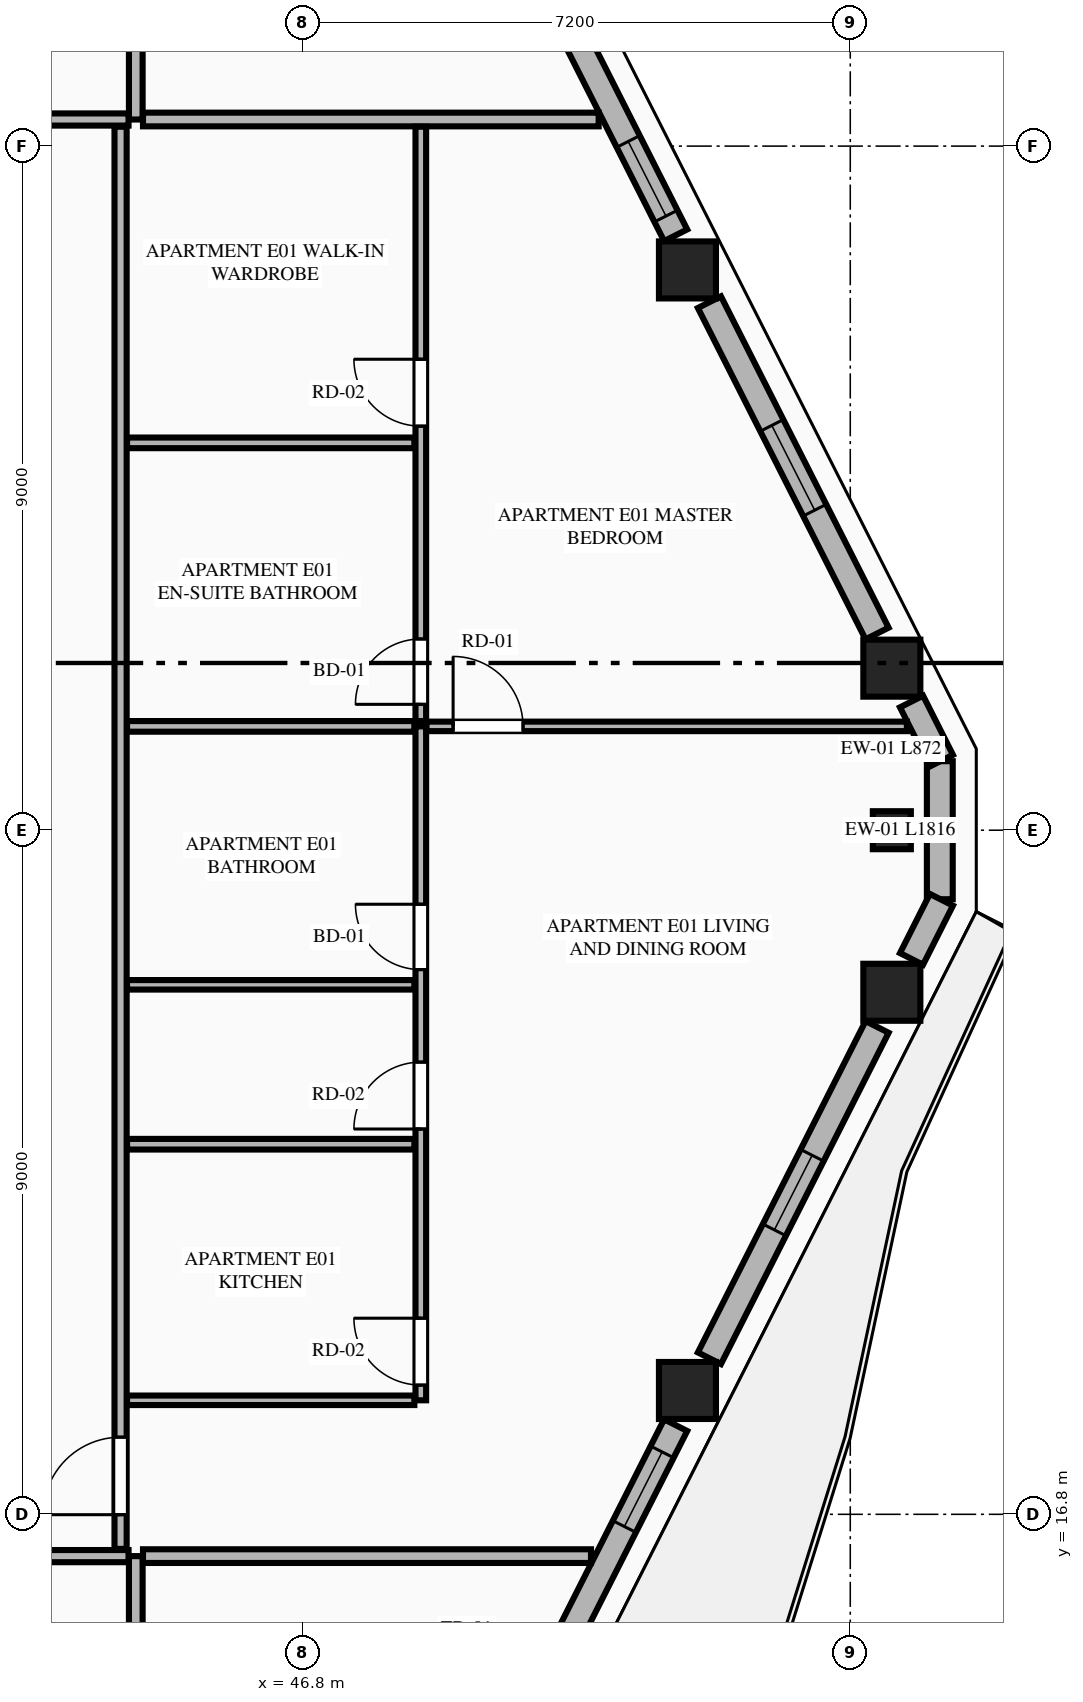
"""IFC4 building model, lengths in metres.
Left out: names, types, materials, properties, quantities, classifications, styles, units other than length and angle.
Written with IfcOpenShell. Run it as: python <this file> out.ifc"""

import sys

from ifc_helpers import new_model, si_unit, direction, frame, frame_2d, origin, origin_2d, place, context, subcontext, project, spatial, rectangle, extrude, element, fill, save


model = new_model("IFC4")
c1 = context("Model", 3, precision=1e-05, world=origin(), true_north=direction((0.0, 1.0)))
c2 = subcontext(c1, "Body", "Model", "MODEL_VIEW")
j1 = project(units=[si_unit("LENGTHUNIT", "METRE"), si_unit("PLANEANGLEUNIT", "RADIAN")], contexts=[c1])
p1 = place(None, origin())
s1 = spatial("IfcSite", under=j1, at=p1, CompositionType="ELEMENT")
p2 = place(p1, origin())
s2 = spatial("IfcBuilding", under=s1, at=p2, CompositionType="ELEMENT")
p3 = place(p2, frame((0.0, 0.0, 207.4)))
s3 = spatial("IfcBuildingStorey", under=s2, at=p3, CompositionType="ELEMENT", Elevation=207.4)
for number, where, z_axis, x_axis in (
    (1, (51.858, 18.429, 0.0), (0.0, 0.0, 1.0), (1.0, 0.0, 0.0)),
    (2, (54.547, 23.668, 0.0), (0.0, 0.0, 1.0), (1.0, 0.0, 0.0)),
    (3, (54.547, 27.932, 0.0), (0.0, 0.0, 1.0), (1.0, 0.0, 0.0)),
    (4, (51.858, 33.171, 0.0), (0.0, 0.0, 1.0), (1.0, 0.0, 0.0)),
):
    element("IfcColumn", number, at=place(p3, frame(where, z_axis=z_axis, x_axis=x_axis)), inside=s3, PredefinedType="COLUMN", context=c2, shape_type="SweptSolid", body=[
        extrude(rectangle(XDim=0.75, YDim=0.75, at=origin_2d()), origin(), (0.0, 0.0, 1.0), 3.55),
    ])
p4 = place(p3, frame((54.547, 25.8, 0.0), z_axis=(0.0, 0.0, 1.0), x_axis=(0.0, 1.0, 0.0)))
e5 = element("IfcColumn", 5, at=p4, inside=s3, PredefinedType="PILASTER", context=c2, shape_type="SweptSolid", body=[
    extrude(rectangle(XDim=0.5, YDim=0.35, at=origin_2d()), origin(), (0.0, 0.0, 1.0), 3.55),
])
p5 = place(p3, frame((55.178, 24.892, 0.0), z_axis=(0.0, 0.0, 1.0), x_axis=(0.0, 1.0, 0.0)))
e6 = element("IfcWall", 6, at=p5, inside=s3, PredefinedType="STANDARD", context=c2, shape_type="SweptSolid", body=[
    extrude(rectangle(XDim=1.816, YDim=0.34, at=frame_2d((0.908, 0.0))), origin(), (0.0, 0.0, 1.0), 3.35),
])
p6 = place(p3, frame((49.403, 13.427, 0.0), z_axis=(0.0, 0.0, 1.0), x_axis=(0.451425765525, 0.892308678777, 0.0)))
e7 = element("IfcWall", 7, at=p6, inside=s3, PredefinedType="STANDARD", context=c2, shape_type="SweptSolid", body=[
    extrude(rectangle(XDim=5.094, YDim=0.34, at=frame_2d((2.547, 0.0))), origin(), (0.0, 0.0, 1.0), 2.883),
])
p7 = place(p6, frame((0.907, 0.0, 0.0)))
e8 = element("IfcOpeningElement", 8, at=p7, cuts=e7, PredefinedType="OPENING", context=c2, shape_type="SweptSolid", body=[
    extrude(rectangle(XDim=1.1, YDim=2.25, at=frame_2d((0.55, 1.125))), frame((0.0, 0.18, 0.0), z_axis=(0.0, -1.0, 0.0), x_axis=(1.0, 0.0, 0.0)), (0.0, 0.0, 1.0), 0.36),
])
p8 = place(p6, frame((3.6, 0.0, 0.75)))
e9 = element("IfcOpeningElement", 9, at=p8, cuts=e7, PredefinedType="OPENING", context=c2, shape_type="SweptSolid", body=[
    extrude(rectangle(XDim=1.1, YDim=1.983, at=frame_2d((0.55, 0.991))), frame((0.0, 0.18, 0.0), z_axis=(0.0, -1.0, 0.0), x_axis=(1.0, 0.0, 0.0)), (0.0, 0.0, 1.0), 0.36),
])
p9 = place(p3, frame((52.147, 18.853, 0.0), z_axis=(0.0, 0.0, 1.0), x_axis=(0.451566029745, 0.892237704191, 0.0)))
e10 = element("IfcWall", 10, at=p9, inside=s3, PredefinedType="STANDARD", context=c2, shape_type="SweptSolid", body=[
    extrude(rectangle(XDim=4.885, YDim=0.34, at=frame_2d((2.443, 0.0))), origin(), (0.0, 0.0, 1.0), 2.883),
])
p10 = place(p9, frame((1.893, 0.0, 0.75)))
e11 = element("IfcOpeningElement", 11, at=p10, cuts=e10, PredefinedType="OPENING", context=c2, shape_type="SweptSolid", body=[
    extrude(rectangle(XDim=1.1, YDim=1.983, at=frame_2d((0.55, 0.991))), frame((0.0, 0.18, 0.0), z_axis=(0.0, -1.0, 0.0), x_axis=(1.0, 0.0, 0.0)), (0.0, 0.0, 1.0), 0.36),
])
p11 = place(p3, frame((54.806, 24.107, 0.0), z_axis=(0.0, 0.0, 1.0), x_axis=(0.450906649871, 0.892571113751, 0.0)))
e12 = element("IfcWall", 12, at=p11, inside=s3, PredefinedType="STANDARD", context=c2, shape_type="SweptSolid", body=[
    extrude(rectangle(XDim=0.872, YDim=0.34, at=frame_2d((0.436, 0.0))), origin(), (0.0, 0.0, 1.0), 3.35),
])
p12 = place(p3, frame((55.199, 26.715, 0.0), z_axis=(0.0, 0.0, 1.0), x_axis=(-0.451019391667, 0.892514150218, 0.0)))
e13 = element("IfcWall", 13, at=p12, inside=s3, PredefinedType="STANDARD", context=c2, shape_type="SweptSolid", body=[
    extrude(rectangle(XDim=0.872, YDim=0.34, at=frame_2d((0.436, 0.0))), origin(), (0.0, 0.0, 1.0), 3.35),
])
p13 = place(p3, frame((54.353, 28.388, 0.0), z_axis=(0.0, 0.0, 1.0), x_axis=(-0.451545895749, 0.892247893824, 0.0)))
e14 = element("IfcWall", 14, at=p13, inside=s3, PredefinedType="STANDARD", context=c2, shape_type="SweptSolid", body=[
    extrude(rectangle(XDim=4.885, YDim=0.34, at=frame_2d((2.443, 0.0))), origin(), (0.0, 0.0, 1.0), 2.883),
])
p14 = place(p13, frame((1.818, 0.0, 0.75)))
e15 = element("IfcOpeningElement", 15, at=p14, cuts=e14, PredefinedType="OPENING", context=c2, shape_type="SweptSolid", body=[
    extrude(rectangle(XDim=1.25, YDim=1.95, at=frame_2d((0.625, 0.975))), frame((0.0, 0.18, 0.0), z_axis=(0.0, -1.0, 0.0), x_axis=(1.0, 0.0, 0.0)), (0.0, 0.0, 1.0), 0.36),
])
p15 = place(p3, frame((51.703, 33.627, 0.0), z_axis=(0.0, 0.0, 1.0), x_axis=(-0.451406462707, 0.892318443957, 0.0)))
e16 = element("IfcWall", 16, at=p15, inside=s3, PredefinedType="STANDARD", context=c2, shape_type="SweptSolid", body=[
    extrude(rectangle(XDim=5.095, YDim=0.34, at=frame_2d((2.547, 0.0))), origin(), (0.0, 0.0, 1.0), 2.883),
])
p16 = place(p15, frame((0.283, 0.0, 0.75)))
e17 = element("IfcOpeningElement", 17, at=p16, cuts=e16, PredefinedType="OPENING", context=c2, shape_type="SweptSolid", body=[
    extrude(rectangle(XDim=1.1, YDim=1.983, at=frame_2d((0.55, 0.991))), frame((0.0, 0.18, 0.0), z_axis=(0.0, -1.0, 0.0), x_axis=(1.0, 0.0, 0.0)), (0.0, 0.0, 1.0), 0.36),
])
p17 = place(p15, frame((2.981, 0.0, 0.75)))
e18 = element("IfcOpeningElement", 18, at=p17, cuts=e16, PredefinedType="OPENING", context=c2, shape_type="SweptSolid", body=[
    extrude(rectangle(XDim=1.1, YDim=1.983, at=frame_2d((0.55, 0.991))), frame((0.0, 0.18, 0.0), z_axis=(0.0, -1.0, 0.0), x_axis=(1.0, 0.0, 0.0)), (0.0, 0.0, 1.0), 0.36),
])
p18 = place(p3, frame((44.6, 5.968, 0.0), z_axis=(0.0, 0.0, 1.0), x_axis=(0.0, 1.0, 0.0)))
e19 = element("IfcWall", 19, at=p18, inside=s3, PredefinedType="PARTITIONING", context=c2, shape_type="SweptSolid", body=[
    extrude(rectangle(XDim=10.282, YDim=0.18, at=frame_2d((5.141, 0.0))), origin(), (0.0, 0.0, 1.0), 3.35),
])
p19 = place(p3, frame((20.295, 16.25, 0.0), z_axis=(0.0, 0.0, 1.0), x_axis=(1.0, 0.0, 0.0)))
e20 = element("IfcWall", 20, at=p19, inside=s3, PredefinedType="PARTITIONING", context=c2, shape_type="SweptSolid", body=[
    extrude(rectangle(XDim=24.21, YDim=0.16, at=frame_2d((12.105, 0.0))), origin(), (0.0, 0.0, 1.0), 3.35),
])
p20 = place(p19, frame((22.005, 0.0, 0.0)))
e21 = element("IfcOpeningElement", 21, at=p20, cuts=e20, PredefinedType="OPENING", context=c2, shape_type="SweptSolid", body=[
    extrude(rectangle(XDim=1.02, YDim=2.25, at=frame_2d((0.51, 1.125))), frame((0.0, 0.09, 0.0), z_axis=(0.0, -1.0, 0.0), x_axis=(1.0, 0.0, 0.0)), (0.0, 0.0, 1.0), 0.18),
])
p21 = place(p3, frame((44.6, 35.15, 0.0), z_axis=(0.0, 0.0, 1.0), x_axis=(0.0, 1.0, 0.0)))
e22 = element("IfcWall", 22, at=p21, inside=s3, PredefinedType="PARTITIONING", context=c2, shape_type="SweptSolid", body=[
    extrude(rectangle(XDim=10.482, YDim=0.18, at=frame_2d((5.241, 0.0))), origin(), (0.0, 0.0, 1.0), 3.35),
])
p22 = place(p3, frame((20.295, 35.15, 0.0), z_axis=(0.0, 0.0, 1.0), x_axis=(1.0, 0.0, 0.0)))
e23 = element("IfcWall", 23, at=p22, inside=s3, PredefinedType="PARTITIONING", context=c2, shape_type="SweptSolid", body=[
    extrude(rectangle(XDim=24.21, YDim=0.16, at=frame_2d((12.105, 0.0))), origin(), (0.0, 0.0, 1.0), 3.35),
])
p23 = place(p22, frame((0.405, 0.0, 0.0)))
e24 = element("IfcOpeningElement", 24, at=p23, cuts=e23, PredefinedType="OPENING", context=c2, shape_type="SweptSolid", body=[
    extrude(rectangle(XDim=1.35, YDim=2.35, at=frame_2d((0.675, 1.175))), frame((0.0, 0.09, 0.0), z_axis=(0.0, -1.0, 0.0), x_axis=(1.0, 0.0, 0.0)), (0.0, 0.0, 1.0), 0.18),
])
p24 = place(p3, frame((44.695, 16.25, 0.0), z_axis=(0.0, 0.0, 1.0), x_axis=(1.0, 0.0, 0.0)))
e25 = element("IfcWall", 25, at=p24, inside=s3, PredefinedType="PARTITIONING", context=c2, shape_type="SweptSolid", body=[
    extrude(rectangle(XDim=5.894, YDim=0.18, at=frame_2d((2.947, 0.0))), origin(), (0.0, 0.0, 1.0), 3.35),
])
p25 = place(p3, frame((44.695, 35.15, 0.0), z_axis=(0.0, 0.0, 1.0), x_axis=(1.0, 0.0, 0.0)))
e26 = element("IfcWall", 26, at=p25, inside=s3, PredefinedType="PARTITIONING", context=c2, shape_type="SweptSolid", body=[
    extrude(rectangle(XDim=5.995, YDim=0.18, at=frame_2d((2.998, 0.0))), origin(), (0.0, 0.0, 1.0), 3.35),
])
p26 = place(p3, frame((44.4, 16.345, 0.0), z_axis=(0.0, 0.0, 1.0), x_axis=(0.0, 1.0, 0.0)))
e27 = element("IfcWall", 27, at=p26, inside=s3, PredefinedType="PARTITIONING", context=c2, shape_type="SweptSolid", body=[
    extrude(rectangle(XDim=18.71, YDim=0.16, at=frame_2d((9.355, 0.0))), origin(), (0.0, 0.0, 1.0), 3.35),
])
p27 = place(p26, frame((0.45, 0.0, 0.0)))
e28 = element("IfcOpeningElement", 28, at=p27, cuts=e27, PredefinedType="OPENING", context=c2, shape_type="SweptSolid", body=[
    extrude(rectangle(XDim=1.02, YDim=2.25, at=frame_2d((0.51, 1.125))), frame((0.0, 0.09, 0.0), z_axis=(0.0, -1.0, 0.0), x_axis=(1.0, 0.0, 0.0)), (0.0, 0.0, 1.0), 0.18),
])
p28 = place(p3, frame((44.485, 18.3, 0.0), z_axis=(0.0, 0.0, 1.0), x_axis=(1.0, 0.0, 0.0)))
e29 = element("IfcWall", 29, at=p28, inside=s3, PredefinedType="PARTITIONING", context=c2, shape_type="SweptSolid", body=[
    extrude(rectangle(XDim=3.78, YDim=0.125, at=frame_2d((1.89, 0.0))), origin(), (0.0, 0.0, 1.0), 2.807),
])
p29 = place(p3, frame((48.35, 18.3, 0.0), z_axis=(0.0, 0.0, 1.0), x_axis=(0.0, 1.0, 0.0)))
e30 = element("IfcWall", 30, at=p29, inside=s3, PredefinedType="PLUMBINGWALL", context=c2, shape_type="SweptSolid", body=[
    extrude(rectangle(XDim=8.866, YDim=0.14, at=frame_2d((4.433, 0.0))), origin(), (0.0, 0.0, 1.0), 3.35),
])
p30 = place(p29, frame((0.2, 0.0, 0.0)))
e31 = element("IfcOpeningElement", 31, at=p30, cuts=e30, PredefinedType="OPENING", context=c2, shape_type="SweptSolid", body=[
    extrude(rectangle(XDim=0.88, YDim=2.15, at=frame_2d((0.44, 1.075))), frame((0.0, 0.08, 0.0), z_axis=(0.0, -1.0, 0.0), x_axis=(1.0, 0.0, 0.0)), (0.0, 0.0, 1.0), 0.16),
])
p31 = place(p29, frame((3.569, 0.0, 0.0)))
e32 = element("IfcOpeningElement", 32, at=p31, cuts=e30, PredefinedType="OPENING", context=c2, shape_type="SweptSolid", body=[
    extrude(rectangle(XDim=0.88, YDim=2.15, at=frame_2d((0.44, 1.075))), frame((0.0, 0.08, 0.0), z_axis=(0.0, -1.0, 0.0), x_axis=(1.0, 0.0, 0.0)), (0.0, 0.0, 1.0), 0.16),
])
p32 = place(p29, frame((5.666, 0.0, 0.0)))
e33 = element("IfcOpeningElement", 33, at=p32, cuts=e30, PredefinedType="OPENING", context=c2, shape_type="SweptSolid", body=[
    extrude(rectangle(XDim=0.86, YDim=2.1, at=frame_2d((0.43, 1.05))), frame((0.0, 0.08, 0.0), z_axis=(0.0, -1.0, 0.0), x_axis=(1.0, 0.0, 0.0)), (0.0, 0.0, 1.0), 0.16),
])
p33 = place(p3, frame((48.35, 27.236, 0.0), z_axis=(0.0, 0.0, 1.0), x_axis=(0.0, 1.0, 0.0)))
e34 = element("IfcWall", 34, at=p33, inside=s3, PredefinedType="PLUMBINGWALL", context=c2, shape_type="SweptSolid", body=[
    extrude(rectangle(XDim=7.819, YDim=0.14, at=frame_2d((3.909, 0.0))), origin(), (0.0, 0.0, 1.0), 3.35),
])
p34 = place(p33, frame((0.22, 0.0, 0.0)))
e35 = element("IfcOpeningElement", 35, at=p34, cuts=e34, PredefinedType="OPENING", context=c2, shape_type="SweptSolid", body=[
    extrude(rectangle(XDim=0.86, YDim=2.1, at=frame_2d((0.43, 1.05))), frame((0.0, 0.08, 0.0), z_axis=(0.0, -1.0, 0.0), x_axis=(1.0, 0.0, 0.0)), (0.0, 0.0, 1.0), 0.16),
])
p35 = place(p33, frame((3.88, 0.0, 0.0)))
e36 = element("IfcOpeningElement", 36, at=p35, cuts=e34, PredefinedType="OPENING", context=c2, shape_type="SweptSolid", body=[
    extrude(rectangle(XDim=0.88, YDim=2.15, at=frame_2d((0.44, 1.075))), frame((0.0, 0.08, 0.0), z_axis=(0.0, -1.0, 0.0), x_axis=(1.0, 0.0, 0.0)), (0.0, 0.0, 1.0), 0.16),
])
p36 = place(p3, frame((44.485, 27.166, 0.0), z_axis=(0.0, 0.0, 1.0), x_axis=(1.0, 0.0, 0.0)))
e37 = element("IfcWall", 37, at=p36, inside=s3, PredefinedType="PLUMBINGWALL", context=c2, shape_type="SweptSolid", body=[
    extrude(rectangle(XDim=3.78, YDim=0.14, at=frame_2d((1.89, 0.0))), origin(), (0.0, 0.0, 1.0), 3.35),
])
p37 = place(p3, frame((48.425, 27.166, 0.0), z_axis=(0.0, 0.0, 1.0), x_axis=(1.0, 0.0, 0.0)))
e38 = element("IfcWall", 38, at=p37, inside=s3, PredefinedType="PARTITIONING", context=c2, shape_type="SweptSolid", body=[
    extrude(rectangle(XDim=6.32, YDim=0.125, at=frame_2d((3.16, 0.0))), origin(), (0.0, 0.0, 1.0), 3.35),
])
p38 = place(p37, frame((0.35, 0.0, 0.0)))
e39 = element("IfcOpeningElement", 39, at=p38, cuts=e38, PredefinedType="OPENING", context=c2, shape_type="SweptSolid", body=[
    extrude(rectangle(XDim=0.92, YDim=2.15, at=frame_2d((0.46, 1.075))), frame((0.0, 0.073, 0.0), z_axis=(0.0, -1.0, 0.0), x_axis=(1.0, 0.0, 0.0)), (0.0, 0.0, 1.0), 0.145),
])
p39 = place(p3, frame((44.485, 21.669, 0.0), z_axis=(0.0, 0.0, 1.0), x_axis=(1.0, 0.0, 0.0)))
e40 = element("IfcWall", 40, at=p39, inside=s3, PredefinedType="PLUMBINGWALL", context=c2, shape_type="SweptSolid", body=[
    extrude(rectangle(XDim=3.78, YDim=0.14, at=frame_2d((1.89, 0.0))), origin(), (0.0, 0.0, 1.0), 3.35),
])
p40 = place(p3, frame((44.485, 23.766, 0.0), z_axis=(0.0, 0.0, 1.0), x_axis=(1.0, 0.0, 0.0)))
e41 = element("IfcWall", 41, at=p40, inside=s3, PredefinedType="PARTITIONING", context=c2, shape_type="SweptSolid", body=[
    extrude(rectangle(XDim=3.78, YDim=0.125, at=frame_2d((1.89, 0.0))), origin(), (0.0, 0.0, 1.0), 2.807),
])
p41 = place(p3, frame((44.485, 30.896, 0.0), z_axis=(0.0, 0.0, 1.0), x_axis=(1.0, 0.0, 0.0)))
e42 = element("IfcWall", 42, at=p41, inside=s3, PredefinedType="PLUMBINGWALL", context=c2, shape_type="SweptSolid", body=[
    extrude(rectangle(XDim=3.78, YDim=0.14, at=frame_2d((1.89, 0.0))), origin(), (0.0, 0.0, 1.0), 3.35),
])
p42 = place(p10, origin())
e43 = element("IfcWindow", 43, at=p42, inside=s3, PartitioningType="SINGLE_PANEL", PredefinedType="WINDOW", context=c2, shape_type="SweptSolid", body=[
    extrude(rectangle(XDim=1.1, YDim=1.983, at=frame_2d((0.55, 0.991))), frame((0.0, 0.03, 0.0), z_axis=(0.0, -1.0, 0.0), x_axis=(1.0, 0.0, 0.0)), (0.0, 0.0, 1.0), 0.06),
])
fill(e11, e43)
p43 = place(p14, origin())
e44 = element("IfcWindow", 44, at=p43, inside=s3, PartitioningType="SINGLE_PANEL", PredefinedType="WINDOW", context=c2, shape_type="SweptSolid", body=[
    extrude(rectangle(XDim=1.25, YDim=1.95, at=frame_2d((0.625, 0.975))), frame((0.0, 0.03, 0.0), z_axis=(0.0, -1.0, 0.0), x_axis=(1.0, 0.0, 0.0)), (0.0, 0.0, 1.0), 0.06),
])
fill(e15, e44)
p44 = place(p16, origin())
e45 = element("IfcWindow", 45, at=p44, inside=s3, PartitioningType="SINGLE_PANEL", PredefinedType="WINDOW", context=c2, shape_type="SweptSolid", body=[
    extrude(rectangle(XDim=1.1, YDim=1.983, at=frame_2d((0.55, 0.991))), frame((0.0, 0.03, 0.0), z_axis=(0.0, -1.0, 0.0), x_axis=(1.0, 0.0, 0.0)), (0.0, 0.0, 1.0), 0.06),
])
fill(e17, e45)
p45 = place(p30, origin())
e46 = element("IfcDoor", 46, at=p45, inside=s3, OperationType="SINGLE_SWING_RIGHT", PredefinedType="DOOR", context=c2, shape_type="SweptSolid", body=[
    extrude(rectangle(XDim=0.88, YDim=2.15, at=frame_2d((0.44, 1.075))), frame((0.0, 0.025, 0.0), z_axis=(0.0, -1.0, 0.0), x_axis=(1.0, 0.0, 0.0)), (0.0, 0.0, 1.0), 0.05),
])
fill(e31, e46)
p46 = place(p31, origin())
e47 = element("IfcDoor", 47, at=p46, inside=s3, OperationType="SINGLE_SWING_LEFT", PredefinedType="DOOR", context=c2, shape_type="SweptSolid", body=[
    extrude(rectangle(XDim=0.88, YDim=2.15, at=frame_2d((0.44, 1.075))), frame((0.0, 0.025, 0.0), z_axis=(0.0, -1.0, 0.0), x_axis=(1.0, 0.0, 0.0)), (0.0, 0.0, 1.0), 0.05),
])
fill(e32, e47)
p47 = place(p32, origin())
e48 = element("IfcDoor", 48, at=p47, inside=s3, OperationType="SINGLE_SWING_RIGHT", PredefinedType="DOOR", context=c2, shape_type="SweptSolid", body=[
    extrude(rectangle(XDim=0.86, YDim=2.1, at=frame_2d((0.43, 1.05))), frame((0.0, 0.025, 0.0), z_axis=(0.0, -1.0, 0.0), x_axis=(1.0, 0.0, 0.0)), (0.0, 0.0, 1.0), 0.05),
])
fill(e33, e48)
p48 = place(p34, origin())
e49 = element("IfcDoor", 49, at=p48, inside=s3, OperationType="SINGLE_SWING_LEFT", PredefinedType="DOOR", context=c2, shape_type="SweptSolid", body=[
    extrude(rectangle(XDim=0.86, YDim=2.1, at=frame_2d((0.43, 1.05))), frame((0.0, 0.025, 0.0), z_axis=(0.0, -1.0, 0.0), x_axis=(1.0, 0.0, 0.0)), (0.0, 0.0, 1.0), 0.05),
])
fill(e35, e49)
p49 = place(p35, origin())
e50 = element("IfcDoor", 50, at=p49, inside=s3, OperationType="SINGLE_SWING_RIGHT", PredefinedType="DOOR", context=c2, shape_type="SweptSolid", body=[
    extrude(rectangle(XDim=0.88, YDim=2.15, at=frame_2d((0.44, 1.075))), frame((0.0, 0.025, 0.0), z_axis=(0.0, -1.0, 0.0), x_axis=(1.0, 0.0, 0.0)), (0.0, 0.0, 1.0), 0.05),
])
fill(e36, e50)
p50 = place(p27, origin())
e51 = element("IfcDoor", 51, at=p50, inside=s3, OperationType="SINGLE_SWING_LEFT", PredefinedType="DOOR", context=c2, shape_type="SweptSolid", body=[
    extrude(rectangle(XDim=1.02, YDim=2.25, at=frame_2d((0.51, 1.125))), frame((0.0, 0.025, 0.0), z_axis=(0.0, -1.0, 0.0), x_axis=(1.0, 0.0, 0.0)), (0.0, 0.0, 1.0), 0.05),
])
fill(e28, e51)
p51 = place(p38, origin())
e52 = element("IfcDoor", 52, at=p51, inside=s3, OperationType="SINGLE_SWING_LEFT", PredefinedType="DOOR", context=c2, shape_type="SweptSolid", body=[
    extrude(rectangle(XDim=0.92, YDim=2.15, at=frame_2d((0.46, 1.075))), frame((0.0, 0.025, 0.0), z_axis=(0.0, -1.0, 0.0), x_axis=(1.0, 0.0, 0.0)), (0.0, 0.0, 1.0), 0.05),
])
fill(e39, e52)
p52 = place(p8, origin())
e53 = element("IfcWindow", 53, at=p52, inside=s3, PartitioningType="SINGLE_PANEL", PredefinedType="WINDOW", context=c2, shape_type="SweptSolid", body=[
    extrude(rectangle(XDim=1.1, YDim=1.983, at=frame_2d((0.55, 0.991))), frame((0.0, 0.03, 0.0), z_axis=(0.0, -1.0, 0.0), x_axis=(1.0, 0.0, 0.0)), (0.0, 0.0, 1.0), 0.06),
])
fill(e9, e53)
save(model, sys.argv[1])
